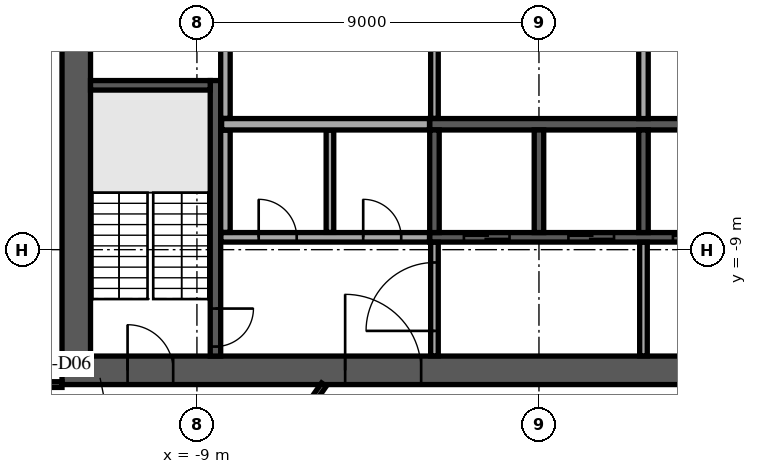
"""IFC4 building model, lengths in metres.
Left out: names, types, materials, properties, quantities, classifications, styles, units other than length and angle.
Written with IfcOpenShell. Run it as: python <this file> out.ifc"""

import sys

from ifc_helpers import new_model, si_unit, direction, frame, frame_2d, origin, place, context, subcontext, project, spatial, rectangle, extrude, element, fill, save


model = new_model("IFC4")
c1 = context("Model", 3, precision=1e-05, world=origin(), true_north=direction((0.0, 1.0)))
c2 = subcontext(c1, "Body", "Model", "MODEL_VIEW")
j1 = project(units=[si_unit("LENGTHUNIT", "METRE"), si_unit("PLANEANGLEUNIT", "RADIAN")], contexts=[c1])
p1 = place(None, origin())
s1 = spatial("IfcSite", under=j1, at=p1, CompositionType="ELEMENT")
p2 = place(p1, origin())
s2 = spatial("IfcBuilding", under=s1, at=p2, CompositionType="ELEMENT")
p3 = place(p2, frame((0.0, 0.0, 246.9)))
s3 = spatial("IfcBuildingStorey", under=s2, at=p3, CompositionType="ELEMENT", Elevation=246.9)
p4 = place(p3, frame((-12.55, -12.175, 0.0), z_axis=(0.0, 0.0, 1.0), x_axis=(1.0, 0.0, 0.0)))
e1 = element("IfcWall", 1, at=p4, inside=s3, PredefinedType="SHEAR", context=c2, shape_type="SweptSolid", body=[
    extrude(rectangle(XDim=25.1, YDim=0.75, at=frame_2d((12.55, 0.0))), origin(), (0.0, 0.0, 1.0), 3.64),
])
p5 = place(p4, frame((7.45, 0.0, 0.0)))
e2 = element("IfcOpeningElement", 2, at=p5, cuts=e1, PredefinedType="OPENING", context=c2, shape_type="SweptSolid", body=[
    extrude(rectangle(XDim=2.0, YDim=2.1, at=frame_2d((1.0, 1.05))), frame((0.0, 0.385, 0.0), z_axis=(0.0, -1.0, 0.0), x_axis=(1.0, 0.0, 0.0)), (0.0, 0.0, 1.0), 0.77),
])
p6 = place(p4, frame((17.575, 0.0, 0.0)))
e3 = element("IfcOpeningElement", 3, at=p6, cuts=e1, PredefinedType="OPENING", context=c2, shape_type="SweptSolid", body=[
    extrude(rectangle(XDim=1.2, YDim=2.1, at=frame_2d((0.6, 1.05))), frame((0.0, 0.385, 0.0), z_axis=(0.0, -1.0, 0.0), x_axis=(1.0, 0.0, 0.0)), (0.0, 0.0, 1.0), 0.77),
])
p7 = place(p4, frame((1.725, 0.0, 0.0)))
e4 = element("IfcOpeningElement", 4, at=p7, cuts=e1, PredefinedType="OPENING", context=c2, shape_type="SweptSolid", body=[
    extrude(rectangle(XDim=1.2, YDim=2.1, at=frame_2d((0.6, 1.05))), frame((0.0, 0.385, 0.0), z_axis=(0.0, -1.0, 0.0), x_axis=(1.0, 0.0, 0.0)), (0.0, 0.0, 1.0), 0.77),
])
p8 = place(p4, frame((22.175, 0.0, 0.0)))
e5 = element("IfcOpeningElement", 5, at=p8, cuts=e1, PredefinedType="OPENING", context=c2, shape_type="SweptSolid", body=[
    extrude(rectangle(XDim=1.2, YDim=2.1, at=frame_2d((0.6, 1.05))), frame((0.0, 0.385, 0.0), z_axis=(0.0, -1.0, 0.0), x_axis=(1.0, 0.0, 0.0)), (0.0, 0.0, 1.0), 0.77),
])
p9 = place(p3, frame((-12.175, -11.8, 0.0), z_axis=(0.0, 0.0, 1.0), x_axis=(0.0, 1.0, 0.0)))
e6 = element("IfcWall", 6, at=p9, inside=s3, PredefinedType="SHEAR", context=c2, shape_type="SweptSolid", body=[
    extrude(rectangle(XDim=23.6, YDim=0.75, at=frame_2d((11.8, 0.0))), origin(), (0.0, 0.0, 1.0), 3.64),
])
p10 = place(p9, frame((10.6, 0.0, 0.0)))
e7 = element("IfcOpeningElement", 7, at=p10, cuts=e6, PredefinedType="OPENING", context=c2, shape_type="SweptSolid", body=[
    extrude(rectangle(XDim=2.4, YDim=2.4, at=frame_2d((1.2, 1.2))), frame((0.0, 0.385, 0.0), z_axis=(0.0, -1.0, 0.0), x_axis=(1.0, 0.0, 0.0)), (0.0, 0.0, 1.0), 0.77),
])
p11 = place(p3, frame((-2.875, -5.7, 0.0), z_axis=(0.0, 0.0, 1.0), x_axis=(1.0, 0.0, 0.0)))
e8 = element("IfcWall", 8, at=p11, inside=s3, PredefinedType="SOLIDWALL", context=c2, shape_type="SweptSolid", body=[
    extrude(rectangle(XDim=11.25, YDim=0.3, at=frame_2d((5.625, 0.0))), origin(), (0.0, 0.0, 1.0), 3.64),
])
p12 = place(p3, frame((2.75, -5.55, 0.0), z_axis=(0.0, 0.0, 1.0), x_axis=(0.0, 1.0, 0.0)))
e9 = element("IfcWall", 9, at=p12, inside=s3, PredefinedType="SOLIDWALL", context=c2, shape_type="SweptSolid", body=[
    extrude(rectangle(XDim=2.7, YDim=0.25, at=frame_2d((1.35, 0.0))), origin(), (0.0, 0.0, 1.0), 3.64),
])
p13 = place(p3, frame((-2.875, -8.675, 0.0), z_axis=(0.0, 0.0, 1.0), x_axis=(1.0, 0.0, 0.0)))
e10 = element("IfcWall", 10, at=p13, inside=s3, PredefinedType="SOLIDWALL", context=c2, shape_type="SweptSolid", body=[
    extrude(rectangle(XDim=11.25, YDim=0.25, at=frame_2d((5.625, 0.0))), origin(), (0.0, 0.0, 1.0), 3.64),
])
p14 = place(p13, frame((0.9, 0.0, 0.0)))
e11 = element("IfcOpeningElement", 11, at=p14, cuts=e10, PredefinedType="OPENING", context=c2, shape_type="SweptSolid", body=[
    extrude(rectangle(XDim=1.2, YDim=2.1, at=frame_2d((0.6, 1.05))), frame((0.0, 0.135, 0.0), z_axis=(0.0, -1.0, 0.0), x_axis=(1.0, 0.0, 0.0)), (0.0, 0.0, 1.0), 0.27),
])
p15 = place(p13, frame((3.65, 0.0, 0.0)))
e12 = element("IfcOpeningElement", 12, at=p15, cuts=e10, PredefinedType="OPENING", context=c2, shape_type="SweptSolid", body=[
    extrude(rectangle(XDim=1.2, YDim=2.1, at=frame_2d((0.6, 1.05))), frame((0.0, 0.135, 0.0), z_axis=(0.0, -1.0, 0.0), x_axis=(1.0, 0.0, 0.0)), (0.0, 0.0, 1.0), 0.27),
])
p16 = place(p13, frame((6.4, 0.0, 0.0)))
e13 = element("IfcOpeningElement", 13, at=p16, cuts=e10, PredefinedType="OPENING", context=c2, shape_type="SweptSolid", body=[
    extrude(rectangle(XDim=1.2, YDim=2.1, at=frame_2d((0.6, 1.05))), frame((0.0, 0.135, 0.0), z_axis=(0.0, -1.0, 0.0), x_axis=(1.0, 0.0, 0.0)), (0.0, 0.0, 1.0), 0.27),
])
p17 = place(p13, frame((9.15, 0.0, 0.0)))
e14 = element("IfcOpeningElement", 14, at=p17, cuts=e10, PredefinedType="OPENING", context=c2, shape_type="SweptSolid", body=[
    extrude(rectangle(XDim=1.2, YDim=2.1, at=frame_2d((0.6, 1.05))), frame((0.0, 0.135, 0.0), z_axis=(0.0, -1.0, 0.0), x_axis=(1.0, 0.0, 0.0)), (0.0, 0.0, 1.0), 0.27),
])
for number, where, z_axis, x_axis in (
    (15, (-2.75, -8.55, 0.0), (0.0, 0.0, 1.0), (0.0, 1.0, 0.0)),
    (16, (0.0, -8.55, 0.0), (0.0, 0.0, 1.0), (0.0, 1.0, 0.0)),
    (17, (2.75, -8.55, 0.0), (0.0, 0.0, 1.0), (0.0, 1.0, 0.0)),
):
    element("IfcWall", number, at=place(p3, frame(where, z_axis=z_axis, x_axis=x_axis)), inside=s3, PredefinedType="SOLIDWALL", context=c2, shape_type="SweptSolid", body=[
        extrude(rectangle(XDim=2.7, YDim=0.25, at=frame_2d((1.35, 0.0))), origin(), (0.0, 0.0, 1.0), 3.64),
    ])
p18 = place(p3, frame((-8.512, -4.55, 0.0), z_axis=(0.0, 0.0, 1.0), x_axis=(0.0, -1.0, 0.0)))
e18 = element("IfcWall", 18, at=p18, inside=s3, PredefinedType="SOLIDWALL", context=c2, shape_type="SweptSolid", body=[
    extrude(rectangle(XDim=7.25, YDim=0.275, at=frame_2d((3.625, 0.0))), origin(), (0.0, 0.0, 1.0), 3.64),
])
p19 = place(p18, frame((6.0, 0.0, 0.0)))
e19 = element("IfcOpeningElement", 19, at=p19, cuts=e18, PredefinedType="OPENING", context=c2, shape_type="SweptSolid", body=[
    extrude(rectangle(XDim=1.0, YDim=2.1, at=frame_2d((0.5, 1.05))), frame((0.0, 0.147, 0.0), z_axis=(0.0, -1.0, 0.0), x_axis=(1.0, 0.0, 0.0)), (0.0, 0.0, 1.0), 0.295),
])
p20 = place(p3, frame((-8.65, -4.675, 0.0), z_axis=(0.0, 0.0, 1.0), x_axis=(-1.0, 0.0, 0.0)))
e20 = element("IfcWall", 20, at=p20, inside=s3, PredefinedType="SOLIDWALL", context=c2, shape_type="SweptSolid", body=[
    extrude(rectangle(XDim=3.15, YDim=0.25, at=frame_2d((1.575, 0.0))), origin(), (0.0, 0.0, 1.0), 3.64),
])
p21 = place(p3, frame((-2.75, -11.795, 0.0), z_axis=(0.0, 0.0, 1.0), x_axis=(0.0, 1.0, 0.0)))
e21 = element("IfcWall", 21, at=p21, inside=s3, PredefinedType="PARTITIONING", context=c2, shape_type="SweptSolid", body=[
    extrude(rectangle(XDim=2.99, YDim=0.2, at=frame_2d((1.495, 0.0))), origin(), (0.0, 0.0, 1.0), 3.64),
])
p22 = place(p21, frame((0.657, 0.0, 0.0)))
e22 = element("IfcOpeningElement", 22, at=p22, cuts=e21, PredefinedType="OPENING", context=c2, shape_type="SweptSolid", body=[
    extrude(rectangle(XDim=1.8, YDim=2.1, at=frame_2d((0.9, 1.05))), frame((0.0, 0.11, 0.0), z_axis=(0.0, -1.0, 0.0), x_axis=(1.0, 0.0, 0.0)), (0.0, 0.0, 1.0), 0.22),
])
p23 = place(p3, frame((2.75, -11.795, 0.0), z_axis=(0.0, 0.0, 1.0), x_axis=(0.0, 1.0, 0.0)))
e23 = element("IfcWall", 23, at=p23, inside=s3, PredefinedType="PARTITIONING", context=c2, shape_type="SweptSolid", body=[
    extrude(rectangle(XDim=2.99, YDim=0.2, at=frame_2d((1.495, 0.0))), origin(), (0.0, 0.0, 1.0), 3.64),
])
p24 = place(p3, frame((-8.37, -8.675, 0.0), z_axis=(0.0, 0.0, 1.0), x_axis=(1.0, 0.0, 0.0)))
e24 = element("IfcWall", 24, at=p24, inside=s3, PredefinedType="PARTITIONING", context=c2, shape_type="SweptSolid", body=[
    extrude(rectangle(XDim=5.49, YDim=0.25, at=frame_2d((2.745, 0.0))), origin(), (0.0, 0.0, 1.0), 3.64),
])
p25 = place(p24, frame((0.995, 0.0, 0.0)))
e25 = element("IfcOpeningElement", 25, at=p25, cuts=e24, PredefinedType="OPENING", context=c2, shape_type="SweptSolid", body=[
    extrude(rectangle(XDim=1.0, YDim=2.1, at=frame_2d((0.5, 1.05))), frame((0.0, 0.135, 0.0), z_axis=(0.0, -1.0, 0.0), x_axis=(1.0, 0.0, 0.0)), (0.0, 0.0, 1.0), 0.27),
])
p26 = place(p24, frame((3.745, 0.0, 0.0)))
e26 = element("IfcOpeningElement", 26, at=p26, cuts=e24, PredefinedType="OPENING", context=c2, shape_type="SweptSolid", body=[
    extrude(rectangle(XDim=1.0, YDim=2.1, at=frame_2d((0.5, 1.05))), frame((0.0, 0.135, 0.0), z_axis=(0.0, -1.0, 0.0), x_axis=(1.0, 0.0, 0.0)), (0.0, 0.0, 1.0), 0.27),
])
p27 = place(p3, frame((-8.25, -8.545, 0.0), z_axis=(0.0, 0.0, 1.0), x_axis=(0.0, 1.0, 0.0)))
e27 = element("IfcWall", 27, at=p27, inside=s3, PredefinedType="PARTITIONING", context=c2, shape_type="SweptSolid", body=[
    extrude(rectangle(XDim=2.69, YDim=0.25, at=frame_2d((1.345, 0.0))), origin(), (0.0, 0.0, 1.0), 3.64),
])
p28 = place(p3, frame((-5.5, -8.545, 0.0), z_axis=(0.0, 0.0, 1.0), x_axis=(0.0, 1.0, 0.0)))
e28 = element("IfcWall", 28, at=p28, inside=s3, PredefinedType="PARTITIONING", context=c2, shape_type="SweptSolid", body=[
    extrude(rectangle(XDim=2.69, YDim=0.2, at=frame_2d((1.345, 0.0))), origin(), (0.0, 0.0, 1.0), 3.64),
])
p29 = place(p3, frame((-8.35, -5.7, 0.0), z_axis=(0.0, 0.0, 1.0), x_axis=(1.0, 0.0, 0.0)))
e29 = element("IfcWall", 29, at=p29, inside=s3, PredefinedType="PARTITIONING", context=c2, shape_type="SweptSolid", body=[
    extrude(rectangle(XDim=5.47, YDim=0.3, at=frame_2d((2.735, 0.0))), origin(), (0.0, 0.0, 1.0), 3.64),
])
p30 = place(p3, frame((-8.25, -5.545, 0.0), z_axis=(0.0, 0.0, 1.0), x_axis=(0.0, 1.0, 0.0)))
e30 = element("IfcWall", 30, at=p30, inside=s3, PredefinedType="PARTITIONING", context=c2, shape_type="SweptSolid", body=[
    extrude(rectangle(XDim=2.69, YDim=0.25, at=frame_2d((1.345, 0.0))), origin(), (0.0, 0.0, 1.0), 3.64),
])
p31 = place(p3, frame((-2.75, -5.545, 0.0), z_axis=(0.0, 0.0, 1.0), x_axis=(0.0, 1.0, 0.0)))
e31 = element("IfcWall", 31, at=p31, inside=s3, PredefinedType="PARTITIONING", context=c2, shape_type="SweptSolid", body=[
    extrude(rectangle(XDim=2.69, YDim=0.2, at=frame_2d((1.345, 0.0))), origin(), (0.0, 0.0, 1.0), 3.64),
])
p32 = place(p3, frame((-5.115, 33.491, 0.0), z_axis=(0.0, 0.0, 1.0), x_axis=(-0.57357740375, -0.819151366908, 0.0)))
e32 = element("IfcWall", 32, at=p32, inside=s3, PredefinedType="STANDARD", context=c2, shape_type="SweptSolid", body=[
    extrude(rectangle(XDim=48.843, YDim=0.6, at=frame_2d((24.422, 0.0))), origin(), (0.0, 0.0, 1.0), 3.64),
])
p33 = place(p32, frame((1.22, 0.0, 0.9)))
e33 = element("IfcOpeningElement", 33, at=p33, cuts=e32, PredefinedType="OPENING", context=c2, shape_type="SweptSolid", body=[
    extrude(rectangle(XDim=2.0, YDim=2.1, at=frame_2d((1.0, 1.05))), frame((0.0, 0.31, 0.0), z_axis=(0.0, -1.0, 0.0), x_axis=(1.0, 0.0, 0.0)), (0.0, 0.0, 1.0), 0.62),
])
p34 = place(p32, frame((5.66, 0.0, 0.9)))
e34 = element("IfcOpeningElement", 34, at=p34, cuts=e32, PredefinedType="OPENING", context=c2, shape_type="SweptSolid", body=[
    extrude(rectangle(XDim=2.0, YDim=2.1, at=frame_2d((1.0, 1.05))), frame((0.0, 0.31, 0.0), z_axis=(0.0, -1.0, 0.0), x_axis=(1.0, 0.0, 0.0)), (0.0, 0.0, 1.0), 0.62),
])
p35 = place(p32, frame((10.101, 0.0, 0.9)))
e35 = element("IfcOpeningElement", 35, at=p35, cuts=e32, PredefinedType="OPENING", context=c2, shape_type="SweptSolid", body=[
    extrude(rectangle(XDim=2.0, YDim=2.1, at=frame_2d((1.0, 1.05))), frame((0.0, 0.31, 0.0), z_axis=(0.0, -1.0, 0.0), x_axis=(1.0, 0.0, 0.0)), (0.0, 0.0, 1.0), 0.62),
])
p36 = place(p32, frame((14.541, 0.0, 0.9)))
e36 = element("IfcOpeningElement", 36, at=p36, cuts=e32, PredefinedType="OPENING", context=c2, shape_type="SweptSolid", body=[
    extrude(rectangle(XDim=2.0, YDim=2.1, at=frame_2d((1.0, 1.05))), frame((0.0, 0.31, 0.0), z_axis=(0.0, -1.0, 0.0), x_axis=(1.0, 0.0, 0.0)), (0.0, 0.0, 1.0), 0.62),
])
p37 = place(p32, frame((18.981, 0.0, 0.9)))
e37 = element("IfcOpeningElement", 37, at=p37, cuts=e32, PredefinedType="OPENING", context=c2, shape_type="SweptSolid", body=[
    extrude(rectangle(XDim=2.0, YDim=2.1, at=frame_2d((1.0, 1.05))), frame((0.0, 0.31, 0.0), z_axis=(0.0, -1.0, 0.0), x_axis=(1.0, 0.0, 0.0)), (0.0, 0.0, 1.0), 0.62),
])
p38 = place(p32, frame((23.422, 0.0, 0.9)))
e38 = element("IfcOpeningElement", 38, at=p38, cuts=e32, PredefinedType="OPENING", context=c2, shape_type="SweptSolid", body=[
    extrude(rectangle(XDim=2.0, YDim=2.1, at=frame_2d((1.0, 1.05))), frame((0.0, 0.31, 0.0), z_axis=(0.0, -1.0, 0.0), x_axis=(1.0, 0.0, 0.0)), (0.0, 0.0, 1.0), 0.62),
])
p39 = place(p32, frame((27.862, 0.0, 0.9)))
e39 = element("IfcOpeningElement", 39, at=p39, cuts=e32, PredefinedType="OPENING", context=c2, shape_type="SweptSolid", body=[
    extrude(rectangle(XDim=2.0, YDim=2.1, at=frame_2d((1.0, 1.05))), frame((0.0, 0.31, 0.0), z_axis=(0.0, -1.0, 0.0), x_axis=(1.0, 0.0, 0.0)), (0.0, 0.0, 1.0), 0.62),
])
p40 = place(p32, frame((32.302, 0.0, 0.9)))
e40 = element("IfcOpeningElement", 40, at=p40, cuts=e32, PredefinedType="OPENING", context=c2, shape_type="SweptSolid", body=[
    extrude(rectangle(XDim=2.0, YDim=2.1, at=frame_2d((1.0, 1.05))), frame((0.0, 0.31, 0.0), z_axis=(0.0, -1.0, 0.0), x_axis=(1.0, 0.0, 0.0)), (0.0, 0.0, 1.0), 0.62),
])
p41 = place(p32, frame((36.742, 0.0, 0.9)))
e41 = element("IfcOpeningElement", 41, at=p41, cuts=e32, PredefinedType="OPENING", context=c2, shape_type="SweptSolid", body=[
    extrude(rectangle(XDim=2.0, YDim=2.1, at=frame_2d((1.0, 1.05))), frame((0.0, 0.31, 0.0), z_axis=(0.0, -1.0, 0.0), x_axis=(1.0, 0.0, 0.0)), (0.0, 0.0, 1.0), 0.62),
])
p42 = place(p32, frame((41.183, 0.0, 0.9)))
e42 = element("IfcOpeningElement", 42, at=p42, cuts=e32, PredefinedType="OPENING", context=c2, shape_type="SweptSolid", body=[
    extrude(rectangle(XDim=2.0, YDim=2.1, at=frame_2d((1.0, 1.05))), frame((0.0, 0.31, 0.0), z_axis=(0.0, -1.0, 0.0), x_axis=(1.0, 0.0, 0.0)), (0.0, 0.0, 1.0), 0.62),
])
p43 = place(p32, frame((45.623, 0.0, 0.9)))
e43 = element("IfcOpeningElement", 43, at=p43, cuts=e32, PredefinedType="OPENING", context=c2, shape_type="SweptSolid", body=[
    extrude(rectangle(XDim=2.0, YDim=2.1, at=frame_2d((1.0, 1.05))), frame((0.0, 0.31, 0.0), z_axis=(0.0, -1.0, 0.0), x_axis=(1.0, 0.0, 0.0)), (0.0, 0.0, 1.0), 0.62),
])
p44 = place(p3, frame((-26.231, -7.537, 0.0), z_axis=(0.0, 0.0, 1.0), x_axis=(0.819166569978, -0.573555690959, 0.0)))
e44 = element("IfcWall", 44, at=p44, inside=s3, PredefinedType="PARTITIONING", context=c2, shape_type="SweptSolid", body=[
    extrude(rectangle(XDim=34.403, YDim=0.15, at=frame_2d((17.201, 0.0))), origin(), (0.0, 0.0, 1.0), 3.24),
])
p45 = place(p44, frame((3.05, 0.0, 0.0)))
e45 = element("IfcOpeningElement", 45, at=p45, cuts=e44, PredefinedType="OPENING", context=c2, shape_type="SweptSolid", body=[
    extrude(rectangle(XDim=1.8, YDim=2.1, at=frame_2d((0.9, 1.05))), frame((0.0, 0.085, 0.0), z_axis=(0.0, -1.0, 0.0), x_axis=(1.0, 0.0, 0.0)), (0.0, 0.0, 1.0), 0.17),
])
p46 = place(p44, frame((13.103, 0.0, 0.0)))
e46 = element("IfcOpeningElement", 46, at=p46, cuts=e44, PredefinedType="OPENING", context=c2, shape_type="SweptSolid", body=[
    extrude(rectangle(XDim=1.0, YDim=2.1, at=frame_2d((0.5, 1.05))), frame((0.0, 0.085, 0.0), z_axis=(0.0, -1.0, 0.0), x_axis=(1.0, 0.0, 0.0)), (0.0, 0.0, 1.0), 0.17),
])
p47 = place(p44, frame((19.173, 0.0, 0.0)))
e47 = element("IfcOpeningElement", 47, at=p47, cuts=e44, PredefinedType="OPENING", context=c2, shape_type="SweptSolid", body=[
    extrude(rectangle(XDim=1.0, YDim=2.1, at=frame_2d((0.5, 1.05))), frame((0.0, 0.085, 0.0), z_axis=(0.0, -1.0, 0.0), x_axis=(1.0, 0.0, 0.0)), (0.0, 0.0, 1.0), 0.17),
])
p48 = place(p3, frame((-14.886, -12.55, 0.0), z_axis=(0.0, 0.0, 1.0), x_axis=(0.819131763787, -0.57360539882, 0.0)))
e48 = element("IfcWall", 48, at=p48, inside=s3, PredefinedType="PARTITIONING", context=c2, shape_type="SweptSolid", body=[
    extrude(rectangle(XDim=7.559, YDim=0.15, at=frame_2d((3.78, 0.0))), origin(), (0.0, 0.0, 1.0), 3.24),
])
p49 = place(p48, frame((4.3, 0.0, 0.0)))
e49 = element("IfcOpeningElement", 49, at=p49, cuts=e48, PredefinedType="OPENING", context=c2, shape_type="SweptSolid", body=[
    extrude(rectangle(XDim=1.0, YDim=2.1, at=frame_2d((0.5, 1.05))), frame((0.0, 0.085, 0.0), z_axis=(0.0, -1.0, 0.0), x_axis=(1.0, 0.0, 0.0)), (0.0, 0.0, 1.0), 0.17),
])
p50 = place(p3, frame((-14.648, -12.55, 0.0), z_axis=(0.0, 0.0, 1.0), x_axis=(1.0, 0.0, 0.0)))
e50 = element("IfcWall", 50, at=p50, inside=s3, PredefinedType="PARTITIONING", context=c2, shape_type="SweptSolid", body=[
    extrude(rectangle(XDim=2.098, YDim=0.15, at=frame_2d((1.049, 0.0))), origin(), (0.0, 0.0, 1.0), 3.24),
])
p51 = place(p3, frame((-8.651, -16.825, 0.0), z_axis=(0.0, 0.0, 1.0), x_axis=(0.57354712093, 0.819172570386, 0.0)))
e51 = element("IfcWall", 51, at=p51, inside=s3, PredefinedType="PARTITIONING", context=c2, shape_type="SweptSolid", body=[
    extrude(rectangle(XDim=5.218, YDim=0.15, at=frame_2d((2.609, 0.0))), origin(), (0.0, 0.0, 1.0), 3.24),
])
p52 = place(p5, origin())
e52 = element("IfcDoor", 52, at=p52, inside=s3, OperationType="SINGLE_SWING_LEFT", PredefinedType="DOOR", context=c2, shape_type="SweptSolid", body=[
    extrude(rectangle(XDim=2.0, YDim=2.1, at=frame_2d((1.0, 1.05))), frame((0.0, 0.025, 0.0), z_axis=(0.0, -1.0, 0.0), x_axis=(1.0, 0.0, 0.0)), (0.0, 0.0, 1.0), 0.05),
])
fill(e2, e52)
p53 = place(p7, origin())
e53 = element("IfcDoor", 53, at=p53, inside=s3, OperationType="SINGLE_SWING_LEFT", PredefinedType="DOOR", context=c2, shape_type="SweptSolid", body=[
    extrude(rectangle(XDim=1.2, YDim=2.1, at=frame_2d((0.6, 1.05))), frame((0.0, 0.025, 0.0), z_axis=(0.0, -1.0, 0.0), x_axis=(1.0, 0.0, 0.0)), (0.0, 0.0, 1.0), 0.05),
])
fill(e4, e53)
p54 = place(p14, origin())
e54 = element("IfcDoor", 54, at=p54, inside=s3, OperationType="DOUBLE_DOOR_SLIDING", PredefinedType="DOOR", context=c2, shape_type="SweptSolid", body=[
    extrude(rectangle(XDim=1.2, YDim=2.1, at=frame_2d((0.6, 1.05))), frame((0.0, 0.025, 0.0), z_axis=(0.0, -1.0, 0.0), x_axis=(1.0, 0.0, 0.0)), (0.0, 0.0, 1.0), 0.05),
])
fill(e11, e54)
p55 = place(p15, origin())
e55 = element("IfcDoor", 55, at=p55, inside=s3, OperationType="DOUBLE_DOOR_SLIDING", PredefinedType="DOOR", context=c2, shape_type="SweptSolid", body=[
    extrude(rectangle(XDim=1.2, YDim=2.1, at=frame_2d((0.6, 1.05))), frame((0.0, 0.025, 0.0), z_axis=(0.0, -1.0, 0.0), x_axis=(1.0, 0.0, 0.0)), (0.0, 0.0, 1.0), 0.05),
])
fill(e12, e55)
p56 = place(p16, origin())
e56 = element("IfcDoor", 56, at=p56, inside=s3, OperationType="DOUBLE_DOOR_SLIDING", PredefinedType="DOOR", context=c2, shape_type="SweptSolid", body=[
    extrude(rectangle(XDim=1.2, YDim=2.1, at=frame_2d((0.6, 1.05))), frame((0.0, 0.025, 0.0), z_axis=(0.0, -1.0, 0.0), x_axis=(1.0, 0.0, 0.0)), (0.0, 0.0, 1.0), 0.05),
])
fill(e13, e56)
p57 = place(p19, origin())
e57 = element("IfcDoor", 57, at=p57, inside=s3, OperationType="SINGLE_SWING_LEFT", PredefinedType="DOOR", context=c2, shape_type="SweptSolid", body=[
    extrude(rectangle(XDim=1.0, YDim=2.1, at=frame_2d((0.5, 1.05))), frame((0.0, 0.025, 0.0), z_axis=(0.0, -1.0, 0.0), x_axis=(1.0, 0.0, 0.0)), (0.0, 0.0, 1.0), 0.05),
])
fill(e19, e57)
p58 = place(p25, origin())
e58 = element("IfcDoor", 58, at=p58, inside=s3, OperationType="SINGLE_SWING_LEFT", PredefinedType="DOOR", context=c2, shape_type="SweptSolid", body=[
    extrude(rectangle(XDim=1.0, YDim=2.1, at=frame_2d((0.5, 1.05))), frame((0.0, 0.025, 0.0), z_axis=(0.0, -1.0, 0.0), x_axis=(1.0, 0.0, 0.0)), (0.0, 0.0, 1.0), 0.05),
])
fill(e25, e58)
p59 = place(p26, origin())
e59 = element("IfcDoor", 59, at=p59, inside=s3, OperationType="SINGLE_SWING_LEFT", PredefinedType="DOOR", context=c2, shape_type="SweptSolid", body=[
    extrude(rectangle(XDim=1.0, YDim=2.1, at=frame_2d((0.5, 1.05))), frame((0.0, 0.025, 0.0), z_axis=(0.0, -1.0, 0.0), x_axis=(1.0, 0.0, 0.0)), (0.0, 0.0, 1.0), 0.05),
])
fill(e26, e59)
p60 = place(p22, origin())
e60 = element("IfcDoor", 60, at=p60, inside=s3, OperationType="SINGLE_SWING_LEFT", PredefinedType="DOOR", context=c2, shape_type="SweptSolid", body=[
    extrude(rectangle(XDim=1.8, YDim=2.1, at=frame_2d((0.9, 1.05))), frame((0.0, 0.025, 0.0), z_axis=(0.0, -1.0, 0.0), x_axis=(1.0, 0.0, 0.0)), (0.0, 0.0, 1.0), 0.05),
])
fill(e22, e60)
save(model, sys.argv[1])
